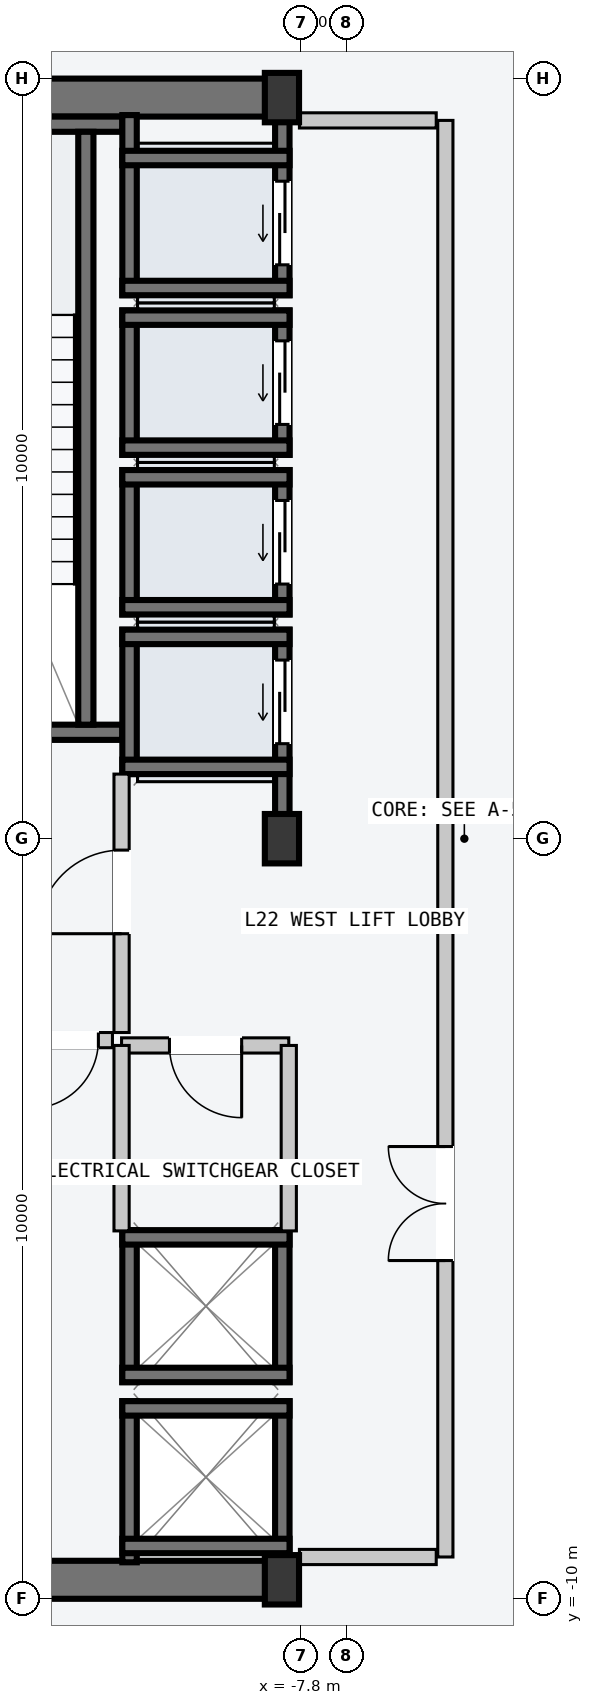
"""IFC4 building model, lengths in metres.
Left out: names, types, materials, properties, quantities, classifications, styles, units other than length and angle.
Written with IfcOpenShell. Run it as: python <this file> out.ifc"""

import sys

from ifc_helpers import new_model, si_unit, direction, frame, frame_2d, origin, origin_2d, place, context, subcontext, project, spatial, rectangle, i_section, extrude, element, fill, save


model = new_model("IFC4")
c1 = context("Model", 3, precision=1e-05, world=origin(), true_north=direction((0.0, 1.0)))
c2 = subcontext(c1, "Body", "Model", "MODEL_VIEW")
j1 = project(units=[si_unit("LENGTHUNIT", "METRE"), si_unit("PLANEANGLEUNIT", "RADIAN")], contexts=[c1])
p1 = place(None, origin())
s1 = spatial("IfcSite", under=j1, at=p1, CompositionType="ELEMENT")
p2 = place(p1, origin())
s2 = spatial("IfcBuilding", under=s1, at=p2, CompositionType="ELEMENT")
p3 = place(p2, frame((0.0, 0.0, 87.3)))
s3 = spatial("IfcBuildingStorey", under=s2, at=p3, CompositionType="ELEMENT", Elevation=87.3)
for number, where, z_axis, x_axis in (
    (1, (-14.53, -9.75, -0.2), (0.0, 0.0, 1.0), (1.0, 0.0, 0.0)),
    (2, (-14.53, 9.75, -0.2), (0.0, 0.0, 1.0), (1.0, 0.0, 0.0)),
):
    element("IfcWall", number, at=place(p3, frame(where, z_axis=z_axis, x_axis=x_axis)), inside=s3, PredefinedType="SHEAR", context=c2, shape_type="SweptSolid", body=[
        extrude(rectangle(XDim=6.46, YDim=0.5, at=frame_2d((3.23, 0.0))), origin(), (0.0, 0.0, 1.0), 4.5),
    ])
p4 = place(p3, frame((-14.25, 1.4, -0.2), z_axis=(0.0, 0.0, 1.0), x_axis=(1.0, 0.0, 0.0)))
e3 = element("IfcWall", 3, at=p4, inside=s3, PredefinedType="SOLIDWALL", context=c2, shape_type="SweptSolid", body=[
    extrude(rectangle(XDim=4.1, YDim=0.2, at=frame_2d((2.05, 0.0))), origin(), (0.0, 0.0, 1.0), 4.5),
])
p5 = place(p4, frame((1.5, 0.0, 0.2)))
e4 = element("IfcOpeningElement", 4, at=p5, cuts=e3, PredefinedType="OPENING", context=c2, shape_type="SweptSolid", body=[
    extrude(rectangle(XDim=1.12, YDim=2.18, at=frame_2d((0.56, 1.09))), frame((0.0, 0.11, 0.0), z_axis=(0.0, -1.0, 0.0), x_axis=(1.0, 0.0, 0.0)), (0.0, 0.0, 1.0), 0.22),
])
p6 = place(p3, frame((-14.25, 9.4, -0.2), z_axis=(0.0, 0.0, 1.0), x_axis=(1.0, 0.0, 0.0)))
e5 = element("IfcWall", 5, at=p6, inside=s3, PredefinedType="SOLIDWALL", context=c2, shape_type="SweptSolid", body=[
    extrude(rectangle(XDim=4.1, YDim=0.2, at=frame_2d((2.05, 0.0))), origin(), (0.0, 0.0, 1.0), 4.5),
])
p7 = place(p3, frame((-10.63, 1.5, -0.2), z_axis=(0.0, 0.0, 1.0), x_axis=(0.0, 1.0, 0.0)))
e6 = element("IfcWall", 6, at=p7, inside=s3, PredefinedType="SOLIDWALL", context=c2, shape_type="SweptSolid", body=[
    extrude(rectangle(XDim=7.8, YDim=0.2, at=frame_2d((3.9, 0.0))), origin(), (0.0, 0.0, 1.0), 4.5),
])
for number, where, z_axis, x_axis in (
    (7, (-8.05, -9.75, 0.0), (0.0, 0.0, 1.0), (1.0, 0.0, 0.0)),
    (8, (-8.05, 0.0, 0.0), (0.0, 0.0, 1.0), (1.0, 0.0, 0.0)),
    (9, (-8.05, 9.75, 0.0), (0.0, 0.0, 1.0), (1.0, 0.0, 0.0)),
):
    element("IfcColumn", number, at=place(p3, frame(where, z_axis=z_axis, x_axis=x_axis)), inside=s3, PredefinedType="COLUMN", context=c2, shape_type="SweptSolid", body=[
        extrude(i_section(OverallWidth=0.45, OverallDepth=0.65, WebThickness=0.025, FlangeThickness=0.04, at=origin_2d()), origin(), (0.0, 0.0, 1.0), 4.5),
    ])
p8 = place(p3, frame((-8.045, 0.21, -0.2), z_axis=(0.0, 0.0, 1.0), x_axis=(0.0, 1.0, 0.0)))
e10 = element("IfcWall", 10, at=p8, inside=s3, PredefinedType="SOLIDWALL", context=c2, shape_type="SweptSolid", body=[
    extrude(rectangle(XDim=2.54, YDim=0.19, at=frame_2d((1.27, 0.0))), origin(), (0.0, 0.0, 1.0), 4.5),
])
p9 = place(p8, frame((1.04, 0.0, 0.2)))
e11 = element("IfcOpeningElement", 11, at=p9, cuts=e10, PredefinedType="OPENING", context=c2, shape_type="SweptSolid", body=[
    extrude(rectangle(XDim=1.1, YDim=2.2, at=frame_2d((0.55, 1.1))), frame((0.0, 0.105, 0.0), z_axis=(0.0, -1.0, 0.0), x_axis=(1.0, 0.0, 0.0)), (0.0, 0.0, 1.0), 0.21),
])
p10 = place(p3, frame((-10.055, 0.85, -0.2), z_axis=(0.0, 0.0, 1.0), x_axis=(0.0, 1.0, 0.0)))
e12 = element("IfcWall", 12, at=p10, inside=s3, PredefinedType="SOLIDWALL", context=c2, shape_type="SweptSolid", body=[
    extrude(rectangle(XDim=1.9, YDim=0.19, at=frame_2d((0.95, 0.0))), origin(), (0.0, 0.0, 1.0), 4.5),
])
for number, where, z_axis, x_axis in (
    (13, (-10.15, 2.655, -0.2), (0.0, 0.0, 1.0), (1.0, 0.0, 0.0)),
    (14, (-10.15, 0.945, -0.2), (0.0, 0.0, 1.0), (1.0, 0.0, 0.0)),
):
    element("IfcWall", number, at=place(p3, frame(where, z_axis=z_axis, x_axis=x_axis)), inside=s3, PredefinedType="SOLIDWALL", context=c2, shape_type="SweptSolid", body=[
        extrude(rectangle(XDim=2.2, YDim=0.19, at=frame_2d((1.1, 0.0))), origin(), (0.0, 0.0, 1.0), 4.5),
    ])
p11 = place(p3, frame((-8.045, 2.95, -0.2), z_axis=(0.0, 0.0, 1.0), x_axis=(0.0, 1.0, 0.0)))
e15 = element("IfcWall", 15, at=p11, inside=s3, PredefinedType="SOLIDWALL", context=c2, shape_type="SweptSolid", body=[
    extrude(rectangle(XDim=1.9, YDim=0.19, at=frame_2d((0.95, 0.0))), origin(), (0.0, 0.0, 1.0), 4.5),
])
p12 = place(p11, frame((0.4, 0.0, 0.2)))
e16 = element("IfcOpeningElement", 16, at=p12, cuts=e15, PredefinedType="OPENING", context=c2, shape_type="SweptSolid", body=[
    extrude(rectangle(XDim=1.1, YDim=2.2, at=frame_2d((0.55, 1.1))), frame((0.0, 0.105, 0.0), z_axis=(0.0, -1.0, 0.0), x_axis=(1.0, 0.0, 0.0)), (0.0, 0.0, 1.0), 0.21),
])
p13 = place(p3, frame((-10.055, 2.95, -0.2), z_axis=(0.0, 0.0, 1.0), x_axis=(0.0, 1.0, 0.0)))
e17 = element("IfcWall", 17, at=p13, inside=s3, PredefinedType="SOLIDWALL", context=c2, shape_type="SweptSolid", body=[
    extrude(rectangle(XDim=1.9, YDim=0.19, at=frame_2d((0.95, 0.0))), origin(), (0.0, 0.0, 1.0), 4.5),
])
for number, where, z_axis, x_axis in (
    (18, (-10.15, 4.755, -0.2), (0.0, 0.0, 1.0), (1.0, 0.0, 0.0)),
    (19, (-10.15, 3.045, -0.2), (0.0, 0.0, 1.0), (1.0, 0.0, 0.0)),
):
    element("IfcWall", number, at=place(p3, frame(where, z_axis=z_axis, x_axis=x_axis)), inside=s3, PredefinedType="SOLIDWALL", context=c2, shape_type="SweptSolid", body=[
        extrude(rectangle(XDim=2.2, YDim=0.19, at=frame_2d((1.1, 0.0))), origin(), (0.0, 0.0, 1.0), 4.5),
    ])
p14 = place(p3, frame((-8.045, 5.05, -0.2), z_axis=(0.0, 0.0, 1.0), x_axis=(0.0, 1.0, 0.0)))
e20 = element("IfcWall", 20, at=p14, inside=s3, PredefinedType="SOLIDWALL", context=c2, shape_type="SweptSolid", body=[
    extrude(rectangle(XDim=1.9, YDim=0.19, at=frame_2d((0.95, 0.0))), origin(), (0.0, 0.0, 1.0), 4.5),
])
p15 = place(p14, frame((0.4, 0.0, 0.2)))
e21 = element("IfcOpeningElement", 21, at=p15, cuts=e20, PredefinedType="OPENING", context=c2, shape_type="SweptSolid", body=[
    extrude(rectangle(XDim=1.1, YDim=2.2, at=frame_2d((0.55, 1.1))), frame((0.0, 0.105, 0.0), z_axis=(0.0, -1.0, 0.0), x_axis=(1.0, 0.0, 0.0)), (0.0, 0.0, 1.0), 0.21),
])
p16 = place(p3, frame((-10.055, 5.05, -0.2), z_axis=(0.0, 0.0, 1.0), x_axis=(0.0, 1.0, 0.0)))
e22 = element("IfcWall", 22, at=p16, inside=s3, PredefinedType="SOLIDWALL", context=c2, shape_type="SweptSolid", body=[
    extrude(rectangle(XDim=1.9, YDim=0.19, at=frame_2d((0.95, 0.0))), origin(), (0.0, 0.0, 1.0), 4.5),
])
for number, where, z_axis, x_axis in (
    (23, (-10.15, 6.855, -0.2), (0.0, 0.0, 1.0), (1.0, 0.0, 0.0)),
    (24, (-10.15, 5.145, -0.2), (0.0, 0.0, 1.0), (1.0, 0.0, 0.0)),
):
    element("IfcWall", number, at=place(p3, frame(where, z_axis=z_axis, x_axis=x_axis)), inside=s3, PredefinedType="SOLIDWALL", context=c2, shape_type="SweptSolid", body=[
        extrude(rectangle(XDim=2.2, YDim=0.19, at=frame_2d((1.1, 0.0))), origin(), (0.0, 0.0, 1.0), 4.5),
    ])
p17 = place(p3, frame((-8.045, 7.15, -0.2), z_axis=(0.0, 0.0, 1.0), x_axis=(0.0, 1.0, 0.0)))
e25 = element("IfcWall", 25, at=p17, inside=s3, PredefinedType="SOLIDWALL", context=c2, shape_type="SweptSolid", body=[
    extrude(rectangle(XDim=2.37, YDim=0.19, at=frame_2d((1.185, 0.0))), origin(), (0.0, 0.0, 1.0), 4.5),
])
p18 = place(p17, frame((0.4, 0.0, 0.2)))
e26 = element("IfcOpeningElement", 26, at=p18, cuts=e25, PredefinedType="OPENING", context=c2, shape_type="SweptSolid", body=[
    extrude(rectangle(XDim=1.1, YDim=2.2, at=frame_2d((0.55, 1.1))), frame((0.0, 0.105, 0.0), z_axis=(0.0, -1.0, 0.0), x_axis=(1.0, 0.0, 0.0)), (0.0, 0.0, 1.0), 0.21),
])
p19 = place(p3, frame((-10.055, 7.15, -0.2), z_axis=(0.0, 0.0, 1.0), x_axis=(0.0, 1.0, 0.0)))
e27 = element("IfcWall", 27, at=p19, inside=s3, PredefinedType="SOLIDWALL", context=c2, shape_type="SweptSolid", body=[
    extrude(rectangle(XDim=2.37, YDim=0.19, at=frame_2d((1.185, 0.0))), origin(), (0.0, 0.0, 1.0), 4.5),
])
for number, where, z_axis, x_axis in (
    (28, (-10.15, 8.955, -0.2), (0.0, 0.0, 1.0), (1.0, 0.0, 0.0)),
    (29, (-10.15, 7.245, -0.2), (0.0, 0.0, 1.0), (1.0, 0.0, 0.0)),
):
    element("IfcWall", number, at=place(p3, frame(where, z_axis=z_axis, x_axis=x_axis)), inside=s3, PredefinedType="SOLIDWALL", context=c2, shape_type="SweptSolid", body=[
        extrude(rectangle(XDim=2.2, YDim=0.19, at=frame_2d((1.1, 0.0))), origin(), (0.0, 0.0, 1.0), 4.5),
    ])
for number, where, z_axis, x_axis in (
    (30, (-8.045, -9.52, -0.2), (0.0, 0.0, 1.0), (0.0, 1.0, 0.0)),
    (31, (-10.055, -9.52, -0.2), (0.0, 0.0, 1.0), (0.0, 1.0, 0.0)),
):
    element("IfcWall", number, at=place(p3, frame(where, z_axis=z_axis, x_axis=x_axis)), inside=s3, PredefinedType="SOLIDWALL", context=c2, shape_type="SweptSolid", body=[
        extrude(rectangle(XDim=2.12, YDim=0.19, at=frame_2d((1.06, 0.0))), origin(), (0.0, 0.0, 1.0), 4.5),
    ])
for number, where, z_axis, x_axis in (
    (32, (-10.15, -7.495, -0.2), (0.0, 0.0, 1.0), (1.0, 0.0, 0.0)),
    (33, (-10.15, -9.305, -0.2), (0.0, 0.0, 1.0), (1.0, 0.0, 0.0)),
):
    element("IfcWall", number, at=place(p3, frame(where, z_axis=z_axis, x_axis=x_axis)), inside=s3, PredefinedType="SOLIDWALL", context=c2, shape_type="SweptSolid", body=[
        extrude(rectangle(XDim=2.2, YDim=0.19, at=frame_2d((1.1, 0.0))), origin(), (0.0, 0.0, 1.0), 4.5),
    ])
for number, where, z_axis, x_axis in (
    (34, (-8.045, -7.15, -0.2), (0.0, 0.0, 1.0), (0.0, 1.0, 0.0)),
    (35, (-10.055, -7.15, -0.2), (0.0, 0.0, 1.0), (0.0, 1.0, 0.0)),
):
    element("IfcWall", number, at=place(p3, frame(where, z_axis=z_axis, x_axis=x_axis)), inside=s3, PredefinedType="SOLIDWALL", context=c2, shape_type="SweptSolid", body=[
        extrude(rectangle(XDim=2.0, YDim=0.19, at=frame_2d((1.0, 0.0))), origin(), (0.0, 0.0, 1.0), 4.5),
    ])
for number, where, z_axis, x_axis in (
    (36, (-10.15, -5.245, -0.2), (0.0, 0.0, 1.0), (1.0, 0.0, 0.0)),
    (37, (-10.15, -7.055, -0.2), (0.0, 0.0, 1.0), (1.0, 0.0, 0.0)),
):
    element("IfcWall", number, at=place(p3, frame(where, z_axis=z_axis, x_axis=x_axis)), inside=s3, PredefinedType="SOLIDWALL", context=c2, shape_type="SweptSolid", body=[
        extrude(rectangle(XDim=2.2, YDim=0.19, at=frame_2d((1.1, 0.0))), origin(), (0.0, 0.0, 1.0), 4.5),
    ])
p20 = place(p3, frame((-5.9, -9.45, 0.0), z_axis=(0.0, 0.0, 1.0), x_axis=(0.0, 1.0, 0.0)))
e38 = element("IfcWall", 38, at=p20, inside=s3, PredefinedType="PARTITIONING", context=c2, shape_type="SweptSolid", body=[
    extrude(rectangle(XDim=18.9, YDim=0.2, at=frame_2d((9.45, 0.0))), origin(), (0.0, 0.0, 1.0), 4.3),
])
p21 = place(p20, frame((3.9, 0.0, 0.0)))
e39 = element("IfcOpeningElement", 39, at=p21, cuts=e38, PredefinedType="OPENING", context=c2, shape_type="SweptSolid", body=[
    extrude(rectangle(XDim=1.5, YDim=2.2, at=frame_2d((0.75, 1.1))), frame((0.0, 0.11, 0.0), z_axis=(0.0, -1.0, 0.0), x_axis=(1.0, 0.0, 0.0)), (0.0, 0.0, 1.0), 0.22),
])
for number, where, z_axis, x_axis in (
    (40, (-6.02, -9.45, 0.0), (0.0, 0.0, 1.0), (-1.0, 0.0, 0.0)),
    (41, (-6.02, 9.45, 0.0), (0.0, 0.0, 1.0), (-1.0, 0.0, 0.0)),
):
    element("IfcWall", number, at=place(p3, frame(where, z_axis=z_axis, x_axis=x_axis)), inside=s3, PredefinedType="PARTITIONING", context=c2, shape_type="SweptSolid", body=[
        extrude(rectangle(XDim=1.8, YDim=0.2, at=frame_2d((0.9, 0.0))), origin(), (0.0, 0.0, 1.0), 4.3),
    ])
p22 = place(p3, frame((-10.16, -2.55, 0.0), z_axis=(0.0, 0.0, 1.0), x_axis=(0.0, 1.0, 0.0)))
e42 = element("IfcWall", 42, at=p22, inside=s3, PredefinedType="PARTITIONING", context=c2, shape_type="SweptSolid", body=[
    extrude(rectangle(XDim=3.4, YDim=0.2, at=frame_2d((1.7, 0.0))), origin(), (0.0, 0.0, 1.0), 4.3),
])
p23 = place(p22, frame((1.3, 0.0, 0.0)))
e43 = element("IfcOpeningElement", 43, at=p23, cuts=e42, PredefinedType="OPENING", context=c2, shape_type="SweptSolid", body=[
    extrude(rectangle(XDim=1.1, YDim=2.15, at=frame_2d((0.55, 1.075))), frame((0.0, 0.11, 0.0), z_axis=(0.0, -1.0, 0.0), x_axis=(1.0, 0.0, 0.0)), (0.0, 0.0, 1.0), 0.22),
])
p24 = place(p3, frame((-10.28, -2.65, 0.0), z_axis=(0.0, 0.0, 1.0), x_axis=(-1.0, 0.0, 0.0)))
e44 = element("IfcWall", 44, at=p24, inside=s3, PredefinedType="PARTITIONING", context=c2, shape_type="SweptSolid", body=[
    extrude(rectangle(XDim=1.27, YDim=0.2, at=frame_2d((0.635, 0.0))), origin(), (0.0, 0.0, 1.0), 4.3),
])
p25 = place(p24, frame((0.185, 0.0, 0.0)))
e45 = element("IfcOpeningElement", 45, at=p25, cuts=e44, PredefinedType="OPENING", context=c2, shape_type="SweptSolid", body=[
    extrude(rectangle(XDim=0.9, YDim=2.15, at=frame_2d((0.45, 1.075))), frame((0.0, 0.11, 0.0), z_axis=(0.0, -1.0, 0.0), x_axis=(1.0, 0.0, 0.0)), (0.0, 0.0, 1.0), 0.22),
])
p26 = place(p3, frame((-7.96, -2.72, 0.0), z_axis=(0.0, 0.0, 1.0), x_axis=(-1.0, 0.0, 0.0)))
e46 = element("IfcWall", 46, at=p26, inside=s3, PredefinedType="PARTITIONING", context=c2, shape_type="SweptSolid", body=[
    extrude(rectangle(XDim=2.2, YDim=0.2, at=frame_2d((1.1, 0.0))), origin(), (0.0, 0.0, 1.0), 4.3),
])
p27 = place(p26, frame((0.62, 0.0, 0.0)))
e47 = element("IfcOpeningElement", 47, at=p27, cuts=e46, PredefinedType="OPENING", context=c2, shape_type="SweptSolid", body=[
    extrude(rectangle(XDim=0.95, YDim=2.1, at=frame_2d((0.475, 1.05))), frame((0.0, 0.11, 0.0), z_axis=(0.0, -1.0, 0.0), x_axis=(1.0, 0.0, 0.0)), (0.0, 0.0, 1.0), 0.22),
])
for number, where, z_axis, x_axis in (
    (48, (-7.96, -5.16, 0.0), (0.0, 0.0, 1.0), (0.0, 1.0, 0.0)),
    (49, (-10.16, -5.16, 0.0), (0.0, 0.0, 1.0), (0.0, 1.0, 0.0)),
):
    element("IfcWall", number, at=place(p3, frame(where, z_axis=z_axis, x_axis=x_axis)), inside=s3, PredefinedType="PARTITIONING", context=c2, shape_type="SweptSolid", body=[
        extrude(rectangle(XDim=2.44, YDim=0.2, at=frame_2d((1.22, 0.0))), origin(), (0.0, 0.0, 1.0), 4.3),
    ])
p28 = place(p9, origin())
e50 = element("IfcDoor", 50, at=p28, inside=s3, OperationType="SLIDING_TO_LEFT", PredefinedType="DOOR", context=c2, shape_type="SweptSolid", body=[
    extrude(rectangle(XDim=1.1, YDim=2.2, at=frame_2d((0.55, 1.1))), frame((0.0, 0.025, 0.0), z_axis=(0.0, -1.0, 0.0), x_axis=(1.0, 0.0, 0.0)), (0.0, 0.0, 1.0), 0.05),
])
fill(e11, e50)
p29 = place(p12, origin())
e51 = element("IfcDoor", 51, at=p29, inside=s3, OperationType="SLIDING_TO_LEFT", PredefinedType="DOOR", context=c2, shape_type="SweptSolid", body=[
    extrude(rectangle(XDim=1.1, YDim=2.2, at=frame_2d((0.55, 1.1))), frame((0.0, 0.025, 0.0), z_axis=(0.0, -1.0, 0.0), x_axis=(1.0, 0.0, 0.0)), (0.0, 0.0, 1.0), 0.05),
])
fill(e16, e51)
p30 = place(p15, origin())
e52 = element("IfcDoor", 52, at=p30, inside=s3, OperationType="SLIDING_TO_LEFT", PredefinedType="DOOR", context=c2, shape_type="SweptSolid", body=[
    extrude(rectangle(XDim=1.1, YDim=2.2, at=frame_2d((0.55, 1.1))), frame((0.0, 0.025, 0.0), z_axis=(0.0, -1.0, 0.0), x_axis=(1.0, 0.0, 0.0)), (0.0, 0.0, 1.0), 0.05),
])
fill(e21, e52)
p31 = place(p18, origin())
e53 = element("IfcDoor", 53, at=p31, inside=s3, OperationType="SLIDING_TO_LEFT", PredefinedType="DOOR", context=c2, shape_type="SweptSolid", body=[
    extrude(rectangle(XDim=1.1, YDim=2.2, at=frame_2d((0.55, 1.1))), frame((0.0, 0.025, 0.0), z_axis=(0.0, -1.0, 0.0), x_axis=(1.0, 0.0, 0.0)), (0.0, 0.0, 1.0), 0.05),
])
fill(e26, e53)
p32 = place(p21, origin())
e54 = element("IfcDoor", 54, at=p32, inside=s3, OperationType="DOUBLE_DOOR_SINGLE_SWING", PredefinedType="DOOR", context=c2, shape_type="SweptSolid", body=[
    extrude(rectangle(XDim=1.5, YDim=2.2, at=frame_2d((0.75, 1.1))), frame((0.0, 0.025, 0.0), z_axis=(0.0, -1.0, 0.0), x_axis=(1.0, 0.0, 0.0)), (0.0, 0.0, 1.0), 0.05),
])
fill(e39, e54)
p33 = place(p23, origin())
e55 = element("IfcDoor", 55, at=p33, inside=s3, OperationType="SINGLE_SWING_LEFT", PredefinedType="DOOR", context=c2, shape_type="SweptSolid", body=[
    extrude(rectangle(XDim=1.1, YDim=2.15, at=frame_2d((0.55, 1.075))), frame((0.0, 0.025, 0.0), z_axis=(0.0, -1.0, 0.0), x_axis=(1.0, 0.0, 0.0)), (0.0, 0.0, 1.0), 0.05),
])
fill(e43, e55)
p34 = place(p25, origin())
e56 = element("IfcDoor", 56, at=p34, inside=s3, OperationType="SINGLE_SWING_RIGHT", PredefinedType="DOOR", context=c2, shape_type="SweptSolid", body=[
    extrude(rectangle(XDim=0.9, YDim=2.15, at=frame_2d((0.45, 1.075))), frame((0.0, 0.025, 0.0), z_axis=(0.0, -1.0, 0.0), x_axis=(1.0, 0.0, 0.0)), (0.0, 0.0, 1.0), 0.05),
])
fill(e45, e56)
p35 = place(p27, origin())
e57 = element("IfcDoor", 57, at=p35, inside=s3, OperationType="SINGLE_SWING_LEFT", PredefinedType="DOOR", context=c2, shape_type="SweptSolid", body=[
    extrude(rectangle(XDim=0.95, YDim=2.1, at=frame_2d((0.475, 1.05))), frame((0.0, 0.025, 0.0), z_axis=(0.0, -1.0, 0.0), x_axis=(1.0, 0.0, 0.0)), (0.0, 0.0, 1.0), 0.05),
])
fill(e47, e57)
save(model, sys.argv[1])
